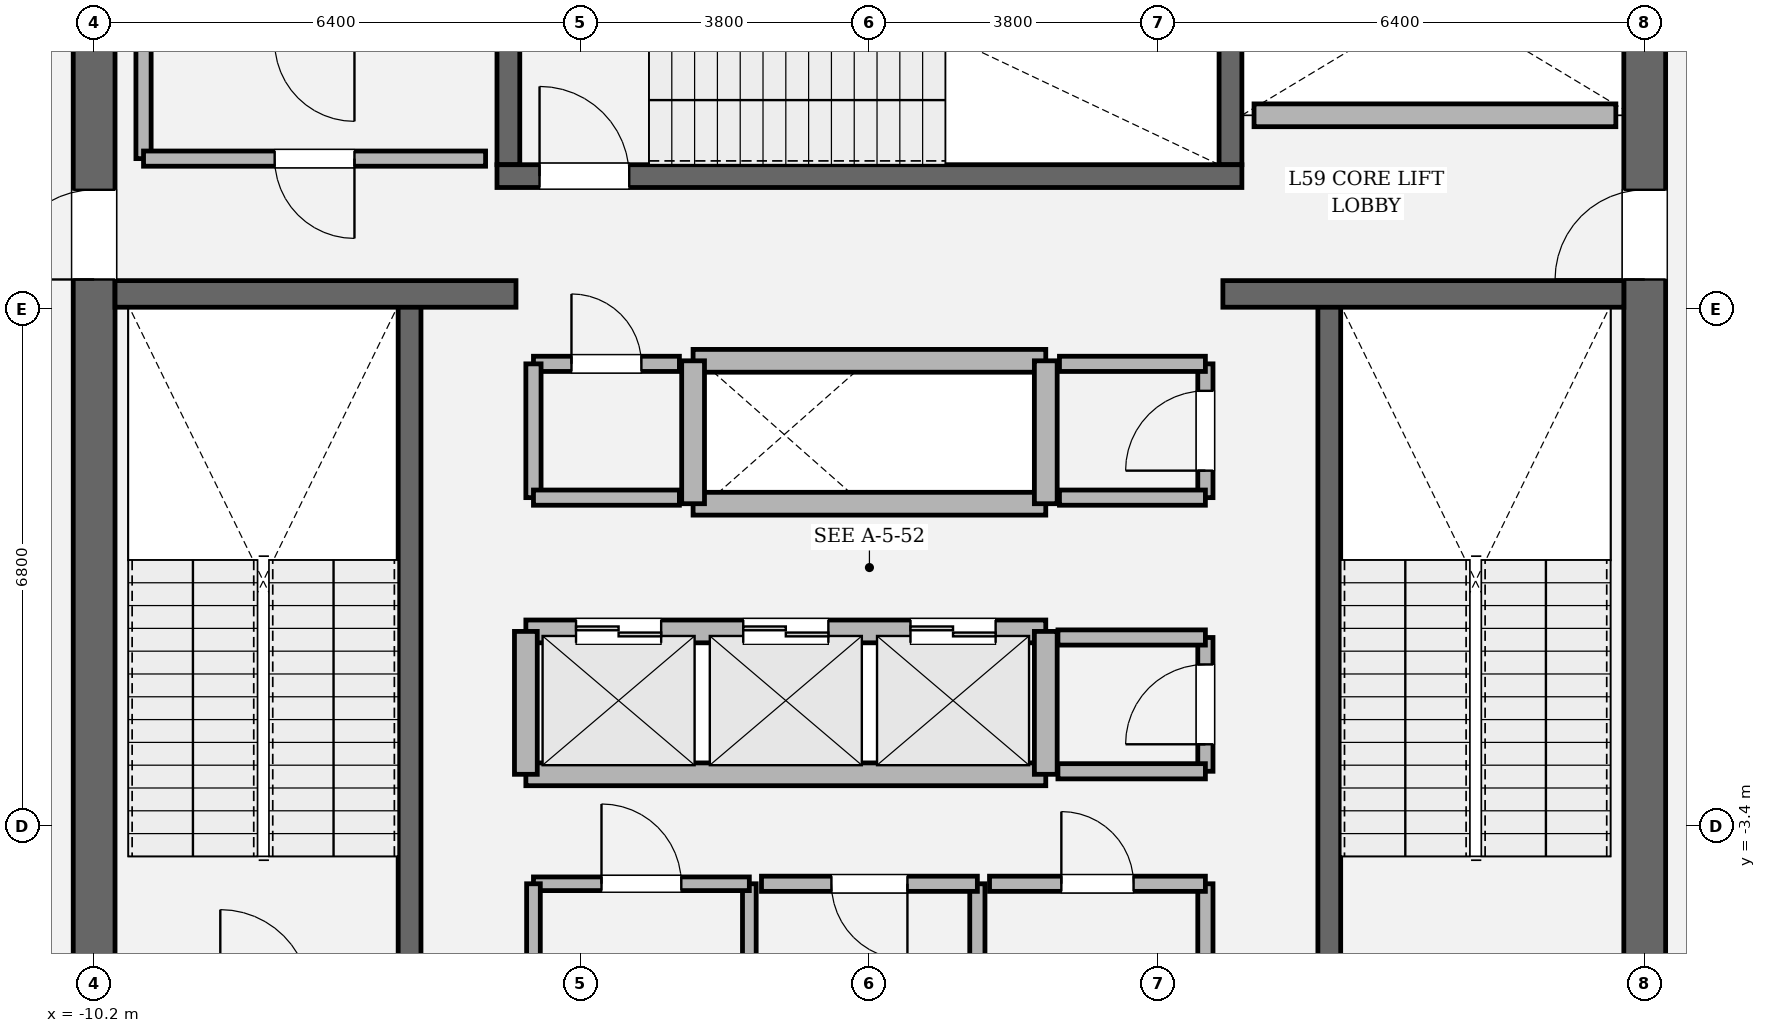
"""IFC4 building model, lengths in metres.
Left out: names, types, materials, properties, quantities, classifications, styles, units other than length and angle.
Written with IfcOpenShell. Run it as: python <this file> out.ifc"""

import sys

from ifc_helpers import new_model, si_unit, direction, frame, frame_2d, origin, place, context, subcontext, project, spatial, rectangle, extrude, element, fill, save


model = new_model("IFC4")
c1 = context("Model", 3, precision=1e-05, world=origin(), true_north=direction((0.0, 1.0)))
c2 = subcontext(c1, "Body", "Model", "MODEL_VIEW")
j1 = project(units=[si_unit("LENGTHUNIT", "METRE"), si_unit("PLANEANGLEUNIT", "RADIAN")], contexts=[c1])
p1 = place(None, origin())
s1 = spatial("IfcSite", under=j1, at=p1, CompositionType="ELEMENT")
p2 = place(p1, origin())
s2 = spatial("IfcBuilding", under=s1, at=p2, CompositionType="ELEMENT")
p3 = place(p2, frame((0.0, 0.0, 251.4)))
s3 = spatial("IfcBuildingStorey", under=s2, at=p3, CompositionType="ELEMENT", Elevation=251.4)
p4 = place(p3, frame((-10.2, -8.925, 0.0), z_axis=(0.0, 0.0, 1.0), x_axis=(0.0, 1.0, 0.0)))
e1 = element("IfcWall", 1, at=p4, inside=s3, PredefinedType="SHEAR", context=c2, shape_type="SweptSolid", body=[
    extrude(rectangle(XDim=17.85, YDim=0.55, at=frame_2d((8.925, 0.0))), origin(), (0.0, 0.0, 1.0), 4.05),
])
p5 = place(p4, frame((12.715, 0.0, 0.0)))
e2 = element("IfcOpeningElement", 2, at=p5, cuts=e1, PredefinedType="OPENING", context=c2, shape_type="SweptSolid", body=[
    extrude(rectangle(XDim=1.18, YDim=2.2, at=frame_2d((0.59, 1.1))), frame((0.0, 0.285, 0.0), z_axis=(0.0, -1.0, 0.0), x_axis=(1.0, 0.0, 0.0)), (0.0, 0.0, 1.0), 0.57),
])
p6 = place(p3, frame((10.2, 8.925, 0.0), z_axis=(0.0, 0.0, 1.0), x_axis=(0.0, -1.0, 0.0)))
e3 = element("IfcWall", 3, at=p6, inside=s3, PredefinedType="SHEAR", context=c2, shape_type="SweptSolid", body=[
    extrude(rectangle(XDim=17.85, YDim=0.55, at=frame_2d((8.925, 0.0))), origin(), (0.0, 0.0, 1.0), 4.05),
])
p7 = place(p6, frame((3.955, 0.0, 0.0)))
e4 = element("IfcOpeningElement", 4, at=p7, cuts=e3, PredefinedType="OPENING", context=c2, shape_type="SweptSolid", body=[
    extrude(rectangle(XDim=1.18, YDim=2.2, at=frame_2d((0.59, 1.1))), frame((0.0, 0.285, 0.0), z_axis=(0.0, -1.0, 0.0), x_axis=(1.0, 0.0, 0.0)), (0.0, 0.0, 1.0), 0.57),
])
for number, where, z_axis, x_axis in (
    (5, (-6.05, -5.5, 0.0), (0.0, 0.0, 1.0), (0.0, 1.0, 0.0)),
    (6, (6.05, 3.45, 0.0), (0.0, 0.0, 1.0), (0.0, -1.0, 0.0)),
):
    element("IfcWall", number, at=place(p3, frame(where, z_axis=z_axis, x_axis=x_axis)), inside=s3, PredefinedType="SOLIDWALL", context=c2, shape_type="SweptSolid", body=[
        extrude(rectangle(XDim=8.95, YDim=0.3, at=frame_2d((4.475, 0.0))), origin(), (0.0, 0.0, 1.0), 4.05),
    ])
for number, where, z_axis, x_axis in (
    (7, (-4.75, 5.3, 0.0), (0.0, 0.0, 1.0), (0.0, 1.0, 0.0)),
    (8, (4.75, 8.925, 0.0), (0.0, 0.0, 1.0), (0.0, -1.0, 0.0)),
):
    element("IfcWall", number, at=place(p3, frame(where, z_axis=z_axis, x_axis=x_axis)), inside=s3, PredefinedType="SOLIDWALL", context=c2, shape_type="SweptSolid", body=[
        extrude(rectangle(XDim=3.625, YDim=0.3, at=frame_2d((1.812, 0.0))), origin(), (0.0, 0.0, 1.0), 4.05),
    ])
p8 = place(p3, frame((-4.9, 5.15, 0.0), z_axis=(0.0, 0.0, 1.0), x_axis=(1.0, 0.0, 0.0)))
e9 = element("IfcWall", 9, at=p8, inside=s3, PredefinedType="SOLIDWALL", context=c2, shape_type="SweptSolid", body=[
    extrude(rectangle(XDim=9.8, YDim=0.3, at=frame_2d((4.9, 0.0))), origin(), (0.0, 0.0, 1.0), 4.05),
])
p9 = place(p8, frame((0.56, 0.0, 0.0)))
e10 = element("IfcOpeningElement", 10, at=p9, cuts=e9, PredefinedType="OPENING", context=c2, shape_type="SweptSolid", body=[
    extrude(rectangle(XDim=1.18, YDim=2.2, at=frame_2d((0.59, 1.1))), frame((0.0, 0.16, 0.0), z_axis=(0.0, -1.0, 0.0), x_axis=(1.0, 0.0, 0.0)), (0.0, 0.0, 1.0), 0.32),
])
for number, where, z_axis, x_axis in (
    (11, (-9.925, 3.6, 0.0), (0.0, 0.0, 1.0), (1.0, 0.0, 0.0)),
    (12, (4.65, 3.6, 0.0), (0.0, 0.0, 1.0), (1.0, 0.0, 0.0)),
):
    element("IfcWall", number, at=place(p3, frame(where, z_axis=z_axis, x_axis=x_axis)), inside=s3, PredefinedType="SOLIDWALL", context=c2, shape_type="SweptSolid", body=[
        extrude(rectangle(XDim=5.275, YDim=0.35, at=frame_2d((2.638, 0.0))), origin(), (0.0, 0.0, 1.0), 4.05),
    ])
p10 = place(p3, frame((-4.52, -0.84, 0.0), z_axis=(0.0, 0.0, 1.0), x_axis=(1.0, 0.0, 0.0)))
e13 = element("IfcWall", 13, at=p10, inside=s3, PredefinedType="SOLIDWALL", context=c2, shape_type="SweptSolid", body=[
    extrude(rectangle(XDim=6.84, YDim=0.3, at=frame_2d((3.42, 0.0))), origin(), (0.0, 0.0, 1.0), 3.85),
])
p11 = place(p10, frame((0.66, 0.0, 0.0)))
e14 = element("IfcOpeningElement", 14, at=p11, cuts=e13, PredefinedType="OPENING", context=c2, shape_type="SweptSolid", body=[
    extrude(rectangle(XDim=1.12, YDim=2.25, at=frame_2d((0.56, 1.125))), frame((0.0, 0.16, 0.0), z_axis=(0.0, -1.0, 0.0), x_axis=(1.0, 0.0, 0.0)), (0.0, 0.0, 1.0), 0.32),
])
p12 = place(p10, frame((2.86, 0.0, 0.0)))
e15 = element("IfcOpeningElement", 15, at=p12, cuts=e13, PredefinedType="OPENING", context=c2, shape_type="SweptSolid", body=[
    extrude(rectangle(XDim=1.12, YDim=2.25, at=frame_2d((0.56, 1.125))), frame((0.0, 0.16, 0.0), z_axis=(0.0, -1.0, 0.0), x_axis=(1.0, 0.0, 0.0)), (0.0, 0.0, 1.0), 0.32),
])
p13 = place(p10, frame((5.06, 0.0, 0.0)))
e16 = element("IfcOpeningElement", 16, at=p13, cuts=e13, PredefinedType="OPENING", context=c2, shape_type="SweptSolid", body=[
    extrude(rectangle(XDim=1.12, YDim=2.25, at=frame_2d((0.56, 1.125))), frame((0.0, 0.16, 0.0), z_axis=(0.0, -1.0, 0.0), x_axis=(1.0, 0.0, 0.0)), (0.0, 0.0, 1.0), 0.32),
])
p14 = place(p3, frame((-4.52, -2.72, 0.0), z_axis=(0.0, 0.0, 1.0), x_axis=(1.0, 0.0, 0.0)))
e17 = element("IfcWall", 17, at=p14, inside=s3, PredefinedType="SOLIDWALL", context=c2, shape_type="SweptSolid", body=[
    extrude(rectangle(XDim=6.84, YDim=0.3, at=frame_2d((3.42, 0.0))), origin(), (0.0, 0.0, 1.0), 3.85),
])
for number, where, z_axis, x_axis in (
    (18, (-4.52, -2.72, 0.0), (0.0, 0.0, 1.0), (0.0, 1.0, 0.0)),
    (19, (2.32, -2.72, 0.0), (0.0, 0.0, 1.0), (0.0, 1.0, 0.0)),
):
    element("IfcWall", number, at=place(p3, frame(where, z_axis=z_axis, x_axis=x_axis)), inside=s3, PredefinedType="SOLIDWALL", context=c2, shape_type="SweptSolid", body=[
        extrude(rectangle(XDim=1.88, YDim=0.3, at=frame_2d((0.94, 0.0))), origin(), (0.0, 0.0, 1.0), 3.85),
    ])
for number, where, z_axis, x_axis in (
    (20, (-2.32, 0.84, 0.0), (0.0, 0.0, 1.0), (1.0, 0.0, 0.0)),
    (21, (-2.32, 2.72, 0.0), (0.0, 0.0, 1.0), (1.0, 0.0, 0.0)),
):
    element("IfcWall", number, at=place(p3, frame(where, z_axis=z_axis, x_axis=x_axis)), inside=s3, PredefinedType="SOLIDWALL", context=c2, shape_type="SweptSolid", body=[
        extrude(rectangle(XDim=4.64, YDim=0.3, at=frame_2d((2.32, 0.0))), origin(), (0.0, 0.0, 1.0), 3.85),
    ])
for number, where, z_axis, x_axis in (
    (22, (-2.32, 0.84, 0.0), (0.0, 0.0, 1.0), (0.0, 1.0, 0.0)),
    (23, (2.32, 0.84, 0.0), (0.0, 0.0, 1.0), (0.0, 1.0, 0.0)),
):
    element("IfcWall", number, at=place(p3, frame(where, z_axis=z_axis, x_axis=x_axis)), inside=s3, PredefinedType="SOLIDWALL", context=c2, shape_type="SweptSolid", body=[
        extrude(rectangle(XDim=1.88, YDim=0.3, at=frame_2d((0.94, 0.0))), origin(), (0.0, 0.0, 1.0), 3.85),
    ])
p15 = place(p3, frame((5.06, 5.95, 0.0), z_axis=(0.0, 0.0, 1.0), x_axis=(1.0, 0.0, 0.0)))
e24 = element("IfcWall", 24, at=p15, inside=s3, PredefinedType="SOLIDWALL", context=c2, shape_type="SweptSolid", body=[
    extrude(rectangle(XDim=4.76, YDim=0.3, at=frame_2d((2.38, 0.0))), origin(), (0.0, 0.0, 1.0), 3.85),
])
p16 = place(p3, frame((-1.58, -5.9, 0.0), z_axis=(0.0, 0.0, 1.0), x_axis=(0.0, 1.0, 0.0)))
e25 = element("IfcWall", 25, at=p16, inside=s3, PredefinedType="PARTITIONING", context=c2, shape_type="SweptSolid", body=[
    extrude(rectangle(XDim=1.74, YDim=0.18, at=frame_2d((0.87, 0.0))), origin(), (0.0, 0.0, 1.0), 3.85),
])
p17 = place(p3, frame((-1.58, -4.16, 0.0), z_axis=(0.0, 0.0, 1.0), x_axis=(-1.0, 0.0, 0.0)))
e26 = element("IfcWall", 26, at=p17, inside=s3, PredefinedType="PARTITIONING", context=c2, shape_type="SweptSolid", body=[
    extrude(rectangle(XDim=2.84, YDim=0.18, at=frame_2d((1.42, 0.0))), origin(), (0.0, 0.0, 1.0), 3.85),
])
p18 = place(p17, frame((0.895, 0.0, 0.0)))
e27 = element("IfcOpeningElement", 27, at=p18, cuts=e26, PredefinedType="OPENING", context=c2, shape_type="SweptSolid", body=[
    extrude(rectangle(XDim=1.05, YDim=2.2, at=frame_2d((0.525, 1.1))), frame((0.0, 0.1, 0.0), z_axis=(0.0, -1.0, 0.0), x_axis=(1.0, 0.0, 0.0)), (0.0, 0.0, 1.0), 0.2),
])
p19 = place(p3, frame((-4.42, -4.16, 0.0), z_axis=(0.0, 0.0, 1.0), x_axis=(0.0, -1.0, 0.0)))
e28 = element("IfcWall", 28, at=p19, inside=s3, PredefinedType="PARTITIONING", context=c2, shape_type="SweptSolid", body=[
    extrude(rectangle(XDim=1.74, YDim=0.18, at=frame_2d((0.87, 0.0))), origin(), (0.0, 0.0, 1.0), 3.85),
])
p20 = place(p3, frame((1.42, -5.9, 0.0), z_axis=(0.0, 0.0, 1.0), x_axis=(0.0, 1.0, 0.0)))
e29 = element("IfcWall", 29, at=p20, inside=s3, PredefinedType="SOLIDWALL", context=c2, shape_type="SweptSolid", body=[
    extrude(rectangle(XDim=1.74, YDim=0.2, at=frame_2d((0.87, 0.0))), origin(), (0.0, 0.0, 1.0), 3.85),
])
p21 = place(p3, frame((1.42, -4.16, 0.0), z_axis=(0.0, 0.0, 1.0), x_axis=(-1.0, 0.0, 0.0)))
e30 = element("IfcWall", 30, at=p21, inside=s3, PredefinedType="SOLIDWALL", context=c2, shape_type="SweptSolid", body=[
    extrude(rectangle(XDim=2.84, YDim=0.2, at=frame_2d((1.42, 0.0))), origin(), (0.0, 0.0, 1.0), 3.85),
])
p22 = place(p21, frame((0.92, 0.0, 0.0)))
e31 = element("IfcOpeningElement", 31, at=p22, cuts=e30, PredefinedType="OPENING", context=c2, shape_type="SweptSolid", body=[
    extrude(rectangle(XDim=1.0, YDim=2.15, at=frame_2d((0.5, 1.075))), frame((0.0, 0.11, 0.0), z_axis=(0.0, -1.0, 0.0), x_axis=(1.0, 0.0, 0.0)), (0.0, 0.0, 1.0), 0.22),
])
p23 = place(p3, frame((4.42, -5.9, 0.0), z_axis=(0.0, 0.0, 1.0), x_axis=(0.0, 1.0, 0.0)))
e32 = element("IfcWall", 32, at=p23, inside=s3, PredefinedType="SOLIDWALL", context=c2, shape_type="SweptSolid", body=[
    extrude(rectangle(XDim=1.74, YDim=0.2, at=frame_2d((0.87, 0.0))), origin(), (0.0, 0.0, 1.0), 3.85),
])
p24 = place(p3, frame((4.42, -4.16, 0.0), z_axis=(0.0, 0.0, 1.0), x_axis=(-1.0, 0.0, 0.0)))
e33 = element("IfcWall", 33, at=p24, inside=s3, PredefinedType="SOLIDWALL", context=c2, shape_type="SweptSolid", body=[
    extrude(rectangle(XDim=2.84, YDim=0.2, at=frame_2d((1.42, 0.0))), origin(), (0.0, 0.0, 1.0), 3.85),
])
p25 = place(p24, frame((0.945, 0.0, 0.0)))
e34 = element("IfcOpeningElement", 34, at=p25, cuts=e33, PredefinedType="OPENING", context=c2, shape_type="SweptSolid", body=[
    extrude(rectangle(XDim=0.95, YDim=2.15, at=frame_2d((0.475, 1.075))), frame((0.0, 0.11, 0.0), z_axis=(0.0, -1.0, 0.0), x_axis=(1.0, 0.0, 0.0)), (0.0, 0.0, 1.0), 0.22),
])
p26 = place(p3, frame((4.42, -2.68, 0.0), z_axis=(0.0, 0.0, 1.0), x_axis=(0.0, 1.0, 0.0)))
e35 = element("IfcWall", 35, at=p26, inside=s3, PredefinedType="SOLIDWALL", context=c2, shape_type="SweptSolid", body=[
    extrude(rectangle(XDim=1.76, YDim=0.2, at=frame_2d((0.88, 0.0))), origin(), (0.0, 0.0, 1.0), 3.85),
])
p27 = place(p26, frame((0.355, 0.0, 0.0)))
e36 = element("IfcOpeningElement", 36, at=p27, cuts=e35, PredefinedType="OPENING", context=c2, shape_type="SweptSolid", body=[
    extrude(rectangle(XDim=1.05, YDim=2.2, at=frame_2d((0.525, 1.1))), frame((0.0, 0.11, 0.0), z_axis=(0.0, -1.0, 0.0), x_axis=(1.0, 0.0, 0.0)), (0.0, 0.0, 1.0), 0.22),
])
for number, where, z_axis, x_axis in (
    (37, (4.42, -0.92, 0.0), (0.0, 0.0, 1.0), (-1.0, 0.0, 0.0)),
    (38, (2.48, -2.68, 0.0), (0.0, 0.0, 1.0), (1.0, 0.0, 0.0)),
):
    element("IfcWall", number, at=place(p3, frame(where, z_axis=z_axis, x_axis=x_axis)), inside=s3, PredefinedType="SOLIDWALL", context=c2, shape_type="SweptSolid", body=[
        extrude(rectangle(XDim=1.94, YDim=0.2, at=frame_2d((0.97, 0.0))), origin(), (0.0, 0.0, 1.0), 3.85),
    ])
p28 = place(p3, frame((-2.5, 2.68, 0.0), z_axis=(0.0, 0.0, 1.0), x_axis=(-1.0, 0.0, 0.0)))
e39 = element("IfcWall", 39, at=p28, inside=s3, PredefinedType="SOLIDWALL", context=c2, shape_type="SweptSolid", body=[
    extrude(rectangle(XDim=1.92, YDim=0.2, at=frame_2d((0.96, 0.0))), origin(), (0.0, 0.0, 1.0), 3.85),
])
p29 = place(p28, frame((0.5, 0.0, 0.0)))
e40 = element("IfcOpeningElement", 40, at=p29, cuts=e39, PredefinedType="OPENING", context=c2, shape_type="SweptSolid", body=[
    extrude(rectangle(XDim=0.92, YDim=2.1, at=frame_2d((0.46, 1.05))), frame((0.0, 0.11, 0.0), z_axis=(0.0, -1.0, 0.0), x_axis=(1.0, 0.0, 0.0)), (0.0, 0.0, 1.0), 0.22),
])
p30 = place(p3, frame((-4.42, 2.68, 0.0), z_axis=(0.0, 0.0, 1.0), x_axis=(0.0, -1.0, 0.0)))
e41 = element("IfcWall", 41, at=p30, inside=s3, PredefinedType="SOLIDWALL", context=c2, shape_type="SweptSolid", body=[
    extrude(rectangle(XDim=1.76, YDim=0.2, at=frame_2d((0.88, 0.0))), origin(), (0.0, 0.0, 1.0), 3.85),
])
p31 = place(p3, frame((-4.42, 0.92, 0.0), z_axis=(0.0, 0.0, 1.0), x_axis=(1.0, 0.0, 0.0)))
e42 = element("IfcWall", 42, at=p31, inside=s3, PredefinedType="SOLIDWALL", context=c2, shape_type="SweptSolid", body=[
    extrude(rectangle(XDim=1.92, YDim=0.2, at=frame_2d((0.96, 0.0))), origin(), (0.0, 0.0, 1.0), 3.85),
])
p32 = place(p3, frame((4.42, 0.92, 0.0), z_axis=(0.0, 0.0, 1.0), x_axis=(0.0, 1.0, 0.0)))
e43 = element("IfcWall", 43, at=p32, inside=s3, PredefinedType="SOLIDWALL", context=c2, shape_type="SweptSolid", body=[
    extrude(rectangle(XDim=1.76, YDim=0.2, at=frame_2d((0.88, 0.0))), origin(), (0.0, 0.0, 1.0), 3.85),
])
p33 = place(p32, frame((0.355, 0.0, 0.0)))
e44 = element("IfcOpeningElement", 44, at=p33, cuts=e43, PredefinedType="OPENING", context=c2, shape_type="SweptSolid", body=[
    extrude(rectangle(XDim=1.05, YDim=2.2, at=frame_2d((0.525, 1.1))), frame((0.0, 0.11, 0.0), z_axis=(0.0, -1.0, 0.0), x_axis=(1.0, 0.0, 0.0)), (0.0, 0.0, 1.0), 0.22),
])
for number, where, z_axis, x_axis in (
    (45, (4.42, 2.68, 0.0), (0.0, 0.0, 1.0), (-1.0, 0.0, 0.0)),
    (46, (2.5, 0.92, 0.0), (0.0, 0.0, 1.0), (1.0, 0.0, 0.0)),
):
    element("IfcWall", number, at=place(p3, frame(where, z_axis=z_axis, x_axis=x_axis)), inside=s3, PredefinedType="SOLIDWALL", context=c2, shape_type="SweptSolid", body=[
        extrude(rectangle(XDim=1.92, YDim=0.2, at=frame_2d((0.96, 0.0))), origin(), (0.0, 0.0, 1.0), 3.85),
    ])
p34 = place(p3, frame((-9.55, 6.92, 0.0), z_axis=(0.0, 0.0, 1.0), x_axis=(0.0, -1.0, 0.0)))
e47 = element("IfcWall", 47, at=p34, inside=s3, PredefinedType="SOLIDWALL", context=c2, shape_type="SweptSolid", body=[
    extrude(rectangle(XDim=1.54, YDim=0.2, at=frame_2d((0.77, 0.0))), origin(), (0.0, 0.0, 1.0), 3.85),
])
p35 = place(p3, frame((-9.55, 5.38, 0.0), z_axis=(0.0, 0.0, 1.0), x_axis=(1.0, 0.0, 0.0)))
e48 = element("IfcWall", 48, at=p35, inside=s3, PredefinedType="SOLIDWALL", context=c2, shape_type="SweptSolid", body=[
    extrude(rectangle(XDim=4.5, YDim=0.2, at=frame_2d((2.25, 0.0))), origin(), (0.0, 0.0, 1.0), 3.85),
])
p36 = place(p35, frame((1.725, 0.0, 0.0)))
e49 = element("IfcOpeningElement", 49, at=p36, cuts=e48, PredefinedType="OPENING", context=c2, shape_type="SweptSolid", body=[
    extrude(rectangle(XDim=1.05, YDim=2.2, at=frame_2d((0.525, 1.1))), frame((0.0, 0.11, 0.0), z_axis=(0.0, -1.0, 0.0), x_axis=(1.0, 0.0, 0.0)), (0.0, 0.0, 1.0), 0.22),
])
p37 = place(p9, origin())
e50 = element("IfcDoor", 50, at=p37, inside=s3, OperationType="SINGLE_SWING_LEFT", PredefinedType="DOOR", context=c2, shape_type="SweptSolid", body=[
    extrude(rectangle(XDim=1.18, YDim=2.2, at=frame_2d((0.59, 1.1))), frame((0.0, 0.025, 0.0), z_axis=(0.0, -1.0, 0.0), x_axis=(1.0, 0.0, 0.0)), (0.0, 0.0, 1.0), 0.05),
])
fill(e10, e50)
p38 = place(p5, origin())
e51 = element("IfcDoor", 51, at=p38, inside=s3, OperationType="SINGLE_SWING_LEFT", PredefinedType="DOOR", context=c2, shape_type="SweptSolid", body=[
    extrude(rectangle(XDim=1.18, YDim=2.2, at=frame_2d((0.59, 1.1))), frame((0.0, 0.025, 0.0), z_axis=(0.0, -1.0, 0.0), x_axis=(1.0, 0.0, 0.0)), (0.0, 0.0, 1.0), 0.05),
])
fill(e2, e51)
p39 = place(p7, origin())
e52 = element("IfcDoor", 52, at=p39, inside=s3, OperationType="SINGLE_SWING_RIGHT", PredefinedType="DOOR", context=c2, shape_type="SweptSolid", body=[
    extrude(rectangle(XDim=1.18, YDim=2.2, at=frame_2d((0.59, 1.1))), frame((0.0, 0.025, 0.0), z_axis=(0.0, -1.0, 0.0), x_axis=(1.0, 0.0, 0.0)), (0.0, 0.0, 1.0), 0.05),
])
fill(e4, e52)
p40 = place(p11, origin())
e53 = element("IfcDoor", 53, at=p40, inside=s3, OperationType="DOUBLE_DOOR_SLIDING", PredefinedType="DOOR", context=c2, shape_type="SweptSolid", body=[
    extrude(rectangle(XDim=1.12, YDim=2.25, at=frame_2d((0.56, 1.125))), frame((0.0, 0.025, 0.0), z_axis=(0.0, -1.0, 0.0), x_axis=(1.0, 0.0, 0.0)), (0.0, 0.0, 1.0), 0.05),
])
fill(e14, e53)
p41 = place(p12, origin())
e54 = element("IfcDoor", 54, at=p41, inside=s3, OperationType="DOUBLE_DOOR_SLIDING", PredefinedType="DOOR", context=c2, shape_type="SweptSolid", body=[
    extrude(rectangle(XDim=1.12, YDim=2.25, at=frame_2d((0.56, 1.125))), frame((0.0, 0.025, 0.0), z_axis=(0.0, -1.0, 0.0), x_axis=(1.0, 0.0, 0.0)), (0.0, 0.0, 1.0), 0.05),
])
fill(e15, e54)
p42 = place(p13, origin())
e55 = element("IfcDoor", 55, at=p42, inside=s3, OperationType="DOUBLE_DOOR_SLIDING", PredefinedType="DOOR", context=c2, shape_type="SweptSolid", body=[
    extrude(rectangle(XDim=1.12, YDim=2.25, at=frame_2d((0.56, 1.125))), frame((0.0, 0.025, 0.0), z_axis=(0.0, -1.0, 0.0), x_axis=(1.0, 0.0, 0.0)), (0.0, 0.0, 1.0), 0.05),
])
fill(e16, e55)
p43 = place(p18, origin())
e56 = element("IfcDoor", 56, at=p43, inside=s3, OperationType="SINGLE_SWING_RIGHT", PredefinedType="DOOR", context=c2, shape_type="SweptSolid", body=[
    extrude(rectangle(XDim=1.05, YDim=2.2, at=frame_2d((0.525, 1.1))), frame((0.0, 0.025, 0.0), z_axis=(0.0, -1.0, 0.0), x_axis=(1.0, 0.0, 0.0)), (0.0, 0.0, 1.0), 0.05),
])
fill(e27, e56)
p44 = place(p22, origin())
e57 = element("IfcDoor", 57, at=p44, inside=s3, OperationType="SINGLE_SWING_LEFT", PredefinedType="DOOR", context=c2, shape_type="SweptSolid", body=[
    extrude(rectangle(XDim=1.0, YDim=2.15, at=frame_2d((0.5, 1.075))), frame((0.0, 0.025, 0.0), z_axis=(0.0, -1.0, 0.0), x_axis=(1.0, 0.0, 0.0)), (0.0, 0.0, 1.0), 0.05),
])
fill(e31, e57)
p45 = place(p25, origin())
e58 = element("IfcDoor", 58, at=p45, inside=s3, OperationType="SINGLE_SWING_RIGHT", PredefinedType="DOOR", context=c2, shape_type="SweptSolid", body=[
    extrude(rectangle(XDim=0.95, YDim=2.15, at=frame_2d((0.475, 1.075))), frame((0.0, 0.025, 0.0), z_axis=(0.0, -1.0, 0.0), x_axis=(1.0, 0.0, 0.0)), (0.0, 0.0, 1.0), 0.05),
])
fill(e34, e58)
p46 = place(p27, origin())
e59 = element("IfcDoor", 59, at=p46, inside=s3, OperationType="SINGLE_SWING_LEFT", PredefinedType="DOOR", context=c2, shape_type="SweptSolid", body=[
    extrude(rectangle(XDim=1.05, YDim=2.2, at=frame_2d((0.525, 1.1))), frame((0.0, 0.025, 0.0), z_axis=(0.0, -1.0, 0.0), x_axis=(1.0, 0.0, 0.0)), (0.0, 0.0, 1.0), 0.05),
])
fill(e36, e59)
p47 = place(p29, origin())
e60 = element("IfcDoor", 60, at=p47, inside=s3, OperationType="SINGLE_SWING_RIGHT", PredefinedType="DOOR", context=c2, shape_type="SweptSolid", body=[
    extrude(rectangle(XDim=0.92, YDim=2.1, at=frame_2d((0.46, 1.05))), frame((0.0, 0.025, 0.0), z_axis=(0.0, -1.0, 0.0), x_axis=(1.0, 0.0, 0.0)), (0.0, 0.0, 1.0), 0.05),
])
fill(e40, e60)
p48 = place(p33, origin())
e61 = element("IfcDoor", 61, at=p48, inside=s3, OperationType="SINGLE_SWING_LEFT", PredefinedType="DOOR", context=c2, shape_type="SweptSolid", body=[
    extrude(rectangle(XDim=1.05, YDim=2.2, at=frame_2d((0.525, 1.1))), frame((0.0, 0.025, 0.0), z_axis=(0.0, -1.0, 0.0), x_axis=(1.0, 0.0, 0.0)), (0.0, 0.0, 1.0), 0.05),
])
fill(e44, e61)
p49 = place(p36, origin())
e62 = element("IfcDoor", 62, at=p49, inside=s3, OperationType="SINGLE_SWING_RIGHT", PredefinedType="DOOR", context=c2, shape_type="SweptSolid", body=[
    extrude(rectangle(XDim=1.05, YDim=2.2, at=frame_2d((0.525, 1.1))), frame((0.0, 0.025, 0.0), z_axis=(0.0, -1.0, 0.0), x_axis=(1.0, 0.0, 0.0)), (0.0, 0.0, 1.0), 0.05),
])
fill(e49, e62)
save(model, sys.argv[1])
